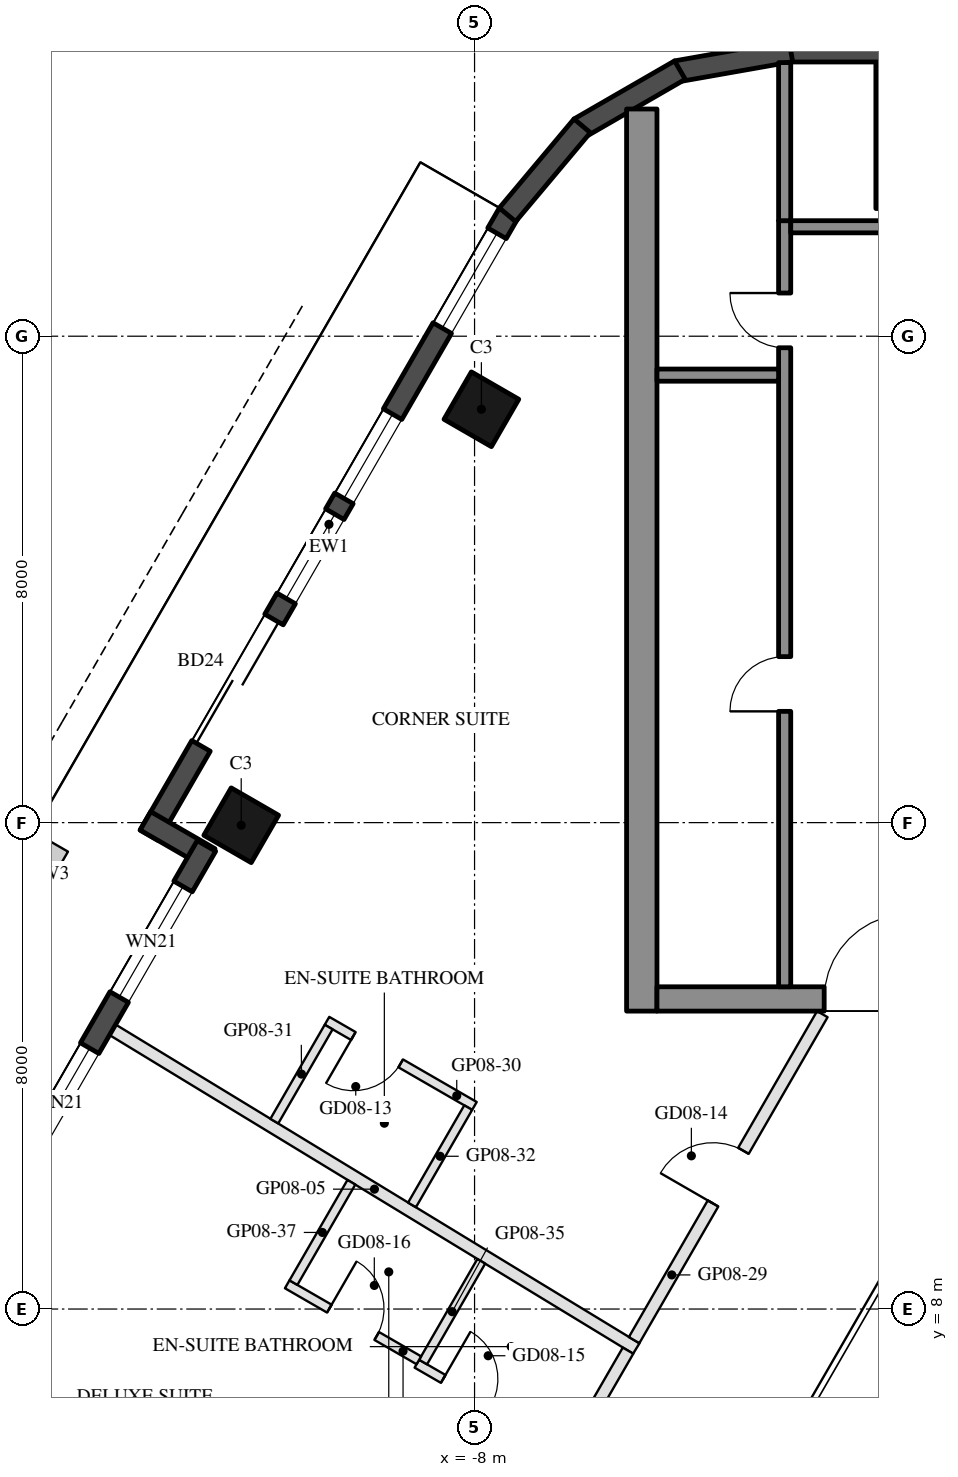
"""IFC4 building model, lengths in metres.
Left out: names, types, materials, properties, quantities, classifications, styles, units other than length and angle.
Written with IfcOpenShell. Run it as: python <this file> out.ifc"""

import sys

from ifc_helpers import new_model, si_unit, direction, frame, frame_2d, origin, origin_2d, place, context, subcontext, project, spatial, rectangle, hollow_rectangle, extrude, element, fill, save


model = new_model("IFC4")
c1 = context("Model", 3, precision=1e-05, world=origin(), true_north=direction((0.0, 1.0)))
c2 = subcontext(c1, "Body", "Model", "MODEL_VIEW")
j1 = project(units=[si_unit("LENGTHUNIT", "METRE"), si_unit("PLANEANGLEUNIT", "RADIAN")], contexts=[c1])
p1 = place(None, origin())
s1 = spatial("IfcSite", under=j1, at=p1, CompositionType="ELEMENT")
p2 = place(p1, origin())
s2 = spatial("IfcBuilding", under=s1, at=p2, CompositionType="ELEMENT")
p3 = place(p2, frame((0.0, 0.0, 105.7)))
s3 = spatial("IfcBuildingStorey", under=s2, at=p3, CompositionType="ELEMENT", Elevation=105.7)
for number, where, z_axis, x_axis in (
    (1, (-7.888, 22.798, 0.0), (0.0, 0.0, 1.0), (0.5, 0.866, 0.0)),
    (2, (-11.838, 15.957, 0.0), (0.0, 0.0, 1.0), (0.5, 0.866, 0.0)),
):
    element("IfcColumn", number, at=place(p3, frame(where, z_axis=z_axis, x_axis=x_axis)), inside=s3, PredefinedType="COLUMN", context=c2, shape_type="SweptSolid", body=[
        extrude(hollow_rectangle(XDim=0.9, YDim=0.9, WallThickness=0.04, at=origin_2d()), origin(), (0.0, 0.0, 1.0), 3.7),
    ])
p4 = place(p3, frame((0.0, 27.3, 0.0), z_axis=(0.0, 0.0, 1.0), x_axis=(1.0, 0.0, 0.0)))
e3 = element("IfcColumn", 3, at=p4, inside=s3, PredefinedType="COLUMN", context=c2, shape_type="SweptSolid", body=[
    extrude(hollow_rectangle(XDim=2.8, YDim=2.4, WallThickness=0.07, at=origin_2d()), origin(), (0.0, 0.0, 1.0), 3.7),
])
p5 = place(p3, frame((-7.441, 26.022, 0.0), z_axis=(0.0, 0.0, 1.0), x_axis=(-0.499992533062, -0.86602971478, 0.0)))
e4 = element("IfcWall", 4, at=p5, inside=s3, PredefinedType="SOLIDWALL", context=c2, shape_type="SweptSolid", body=[
    extrude(rectangle(XDim=11.816, YDim=0.35, at=frame_2d((5.908, 0.0))), origin(), (0.0, 0.0, 1.0), 3.55),
])
p6 = place(p5, frame((0.381, 0.0, 0.3)))
e5 = element("IfcOpeningElement", 5, at=p6, cuts=e4, PredefinedType="OPENING", context=c2, shape_type="SweptSolid", body=[
    extrude(rectangle(XDim=1.8, YDim=2.65, at=frame_2d((0.9, 1.325))), frame((0.0, 0.185, 0.0), z_axis=(0.0, -1.0, 0.0), x_axis=(1.0, 0.0, 0.0)), (0.0, 0.0, 1.0), 0.37),
])
p7 = place(p5, frame((7.716, 0.0, 0.0)))
e6 = element("IfcOpeningElement", 6, at=p7, cuts=e4, PredefinedType="OPENING", context=c2, shape_type="SweptSolid", body=[
    extrude(rectangle(XDim=2.4, YDim=2.4, at=frame_2d((1.2, 1.2))), frame((0.0, 0.185, 0.0), z_axis=(0.0, -1.0, 0.0), x_axis=(1.0, 0.0, 0.0)), (0.0, 0.0, 1.0), 0.37),
])
p8 = place(p5, frame((3.815, 0.0, 0.3)))
e7 = element("IfcOpeningElement", 7, at=p8, cuts=e4, PredefinedType="OPENING", context=c2, shape_type="SweptSolid", body=[
    extrude(rectangle(XDim=1.6, YDim=2.65, at=frame_2d((0.8, 1.325))), frame((0.0, 0.185, 0.0), z_axis=(0.0, -1.0, 0.0), x_axis=(1.0, 0.0, 0.0)), (0.0, 0.0, 1.0), 0.37),
])
p9 = place(p5, frame((5.715, 0.0, 0.3)))
e8 = element("IfcOpeningElement", 8, at=p9, cuts=e4, PredefinedType="OPENING", context=c2, shape_type="SweptSolid", body=[
    extrude(rectangle(XDim=1.6, YDim=2.65, at=frame_2d((0.8, 1.325))), frame((0.0, 0.185, 0.0), z_axis=(0.0, -1.0, 0.0), x_axis=(1.0, 0.0, 0.0)), (0.0, 0.0, 1.0), 0.37),
])
p10 = place(p3, frame((-13.413, 16.029, 0.0), z_axis=(0.0, 0.0, 1.0), x_axis=(0.866005645448, -0.500034220881, 0.0)))
e9 = element("IfcWall", 9, at=p10, inside=s3, PredefinedType="SOLIDWALL", context=c2, shape_type="SweptSolid", body=[
    extrude(rectangle(XDim=1.22, YDim=0.35, at=frame_2d((0.61, 0.0))), origin(), (0.0, 0.0, 1.0), 3.55),
])
p11 = place(p3, frame((-12.409, 15.617, 0.0), z_axis=(0.0, 0.0, 1.0), x_axis=(-0.500003597184, -0.866023326939, 0.0)))
e10 = element("IfcWall", 10, at=p11, inside=s3, PredefinedType="SOLIDWALL", context=c2, shape_type="SweptSolid", body=[
    extrude(rectangle(XDim=6.74, YDim=0.35, at=frame_2d((3.37, 0.0))), origin(), (0.0, 0.0, 1.0), 3.55),
])
p12 = place(p11, frame((0.77, 0.0, 0.3)))
e11 = element("IfcOpeningElement", 11, at=p12, cuts=e10, PredefinedType="OPENING", context=c2, shape_type="SweptSolid", body=[
    extrude(rectangle(XDim=2.1, YDim=2.65, at=frame_2d((1.05, 1.325))), frame((0.0, 0.185, 0.0), z_axis=(0.0, -1.0, 0.0), x_axis=(1.0, 0.0, 0.0)), (0.0, 0.0, 1.0), 0.37),
])
p13 = place(p11, frame((3.841, 0.0, 0.3)))
e12 = element("IfcOpeningElement", 12, at=p13, cuts=e10, PredefinedType="OPENING", context=c2, shape_type="SweptSolid", body=[
    extrude(rectangle(XDim=2.1, YDim=2.65, at=frame_2d((1.05, 1.325))), frame((0.0, 0.185, 0.0), z_axis=(0.0, -1.0, 0.0), x_axis=(1.0, 0.0, 0.0)), (0.0, 0.0, 1.0), 0.37),
])
p14 = place(p3, frame((2.829, 28.685, 0.0), z_axis=(0.0, 0.0, 1.0), x_axis=(-1.0, 0.0, 0.0)))
e13 = element("IfcWall", 13, at=p14, inside=s3, PredefinedType="SOLIDWALL", context=c2, shape_type="SweptSolid", body=[
    extrude(rectangle(XDim=5.658, YDim=0.35, at=frame_2d((2.829, 0.0))), origin(), (0.0, 0.0, 1.0), 3.55),
])
for number, where, z_axis, x_axis in (
    (14, (-2.799, 28.688, 0.0), (0.0, 0.0, 1.0), (-0.985, -0.174, 0.0)),
    (15, (-4.623, 28.377, 0.0), (0.0, 0.0, 1.0), (-0.866, -0.5, 0.0)),
):
    element("IfcWall", number, at=place(p3, frame(where, z_axis=z_axis, x_axis=x_axis)), inside=s3, PredefinedType="SOLIDWALL", context=c2, shape_type="SweptSolid", body=[
        extrude(rectangle(XDim=1.91, YDim=0.35, at=frame_2d((0.955, 0.0))), origin(), (0.0, 0.0, 1.0), 3.55),
    ])
p15 = place(p3, frame((-6.23, 27.461, 0.0), z_axis=(0.0, 0.0, 1.0), x_axis=(-0.642808304945, -0.766027077259, 0.0)))
e16 = element("IfcWall", 16, at=p15, inside=s3, PredefinedType="SOLIDWALL", context=c2, shape_type="SweptSolid", body=[
    extrude(rectangle(XDim=1.91, YDim=0.35, at=frame_2d((0.955, 0.0))), origin(), (0.0, 0.0, 1.0), 3.55),
])
p16 = place(p3, frame((-5.25, 12.9, 0.0), z_axis=(0.0, 0.0, 1.0), x_axis=(0.0, 1.0, 0.0)))
e17 = element("IfcWall", 17, at=p16, inside=s3, PredefinedType="SHEAR", context=c2, shape_type="SweptSolid", body=[
    extrude(rectangle(XDim=14.837, YDim=0.5, at=frame_2d((7.418, 0.0))), origin(), (0.0, 0.0, 1.0), 3.5),
])
p17 = place(p3, frame((5.0, 13.1, 0.0), z_axis=(0.0, 0.0, 1.0), x_axis=(-1.0, 0.0, 0.0)))
e18 = element("IfcWall", 18, at=p17, inside=s3, PredefinedType="SHEAR", context=c2, shape_type="SweptSolid", body=[
    extrude(rectangle(XDim=10.0, YDim=0.4, at=frame_2d((5.0, 0.0))), origin(), (0.0, 0.0, 1.0), 3.5),
])
p18 = place(p17, frame((3.55, 0.0, 0.0)))
e19 = element("IfcOpeningElement", 19, at=p18, cuts=e18, PredefinedType="OPENING", context=c2, shape_type="SweptSolid", body=[
    extrude(rectangle(XDim=1.1, YDim=2.1, at=frame_2d((0.55, 1.05))), frame((0.0, 0.21, 0.0), z_axis=(0.0, -1.0, 0.0), x_axis=(1.0, 0.0, 0.0)), (0.0, 0.0, 1.0), 0.42),
])
p19 = place(p17, frame((5.85, 0.0, 0.0)))
e20 = element("IfcOpeningElement", 20, at=p19, cuts=e18, PredefinedType="OPENING", context=c2, shape_type="SweptSolid", body=[
    extrude(rectangle(XDim=1.4, YDim=2.1, at=frame_2d((0.7, 1.05))), frame((0.0, 0.21, 0.0), z_axis=(0.0, -1.0, 0.0), x_axis=(1.0, 0.0, 0.0)), (0.0, 0.0, 1.0), 0.42),
])
p20 = place(p3, frame((-2.9, 13.3, 0.0), z_axis=(0.0, 0.0, 1.0), x_axis=(0.0, 1.0, 0.0)))
e21 = element("IfcWall", 21, at=p20, inside=s3, PredefinedType="SHEAR", context=c2, shape_type="SweptSolid", body=[
    extrude(rectangle(XDim=12.6, YDim=0.2, at=frame_2d((6.3, 0.0))), origin(), (0.0, 0.0, 1.0), 3.5),
])
p21 = place(p20, frame((4.53, 0.0, 0.0)))
e22 = element("IfcOpeningElement", 22, at=p21, cuts=e21, PredefinedType="OPENING", context=c2, shape_type="SweptSolid", body=[
    extrude(rectangle(XDim=0.9, YDim=2.1, at=frame_2d((0.45, 1.05))), frame((0.0, 0.11, 0.0), z_axis=(0.0, -1.0, 0.0), x_axis=(1.0, 0.0, 0.0)), (0.0, 0.0, 1.0), 0.22),
])
p22 = place(p20, frame((10.51, 0.0, 0.0)))
e23 = element("IfcOpeningElement", 23, at=p22, cuts=e21, PredefinedType="OPENING", context=c2, shape_type="SweptSolid", body=[
    extrude(rectangle(XDim=0.9, YDim=2.1, at=frame_2d((0.45, 1.05))), frame((0.0, 0.11, 0.0), z_axis=(0.0, -1.0, 0.0), x_axis=(1.0, 0.0, 0.0)), (0.0, 0.0, 1.0), 0.22),
])
p23 = place(p3, frame((-0.4, 25.8, 0.0), z_axis=(0.0, 0.0, 1.0), x_axis=(-1.0, 0.0, 0.0)))
e24 = element("IfcWall", 24, at=p23, inside=s3, PredefinedType="SHEAR", context=c2, shape_type="SweptSolid", body=[
    extrude(rectangle(XDim=2.4, YDim=0.2, at=frame_2d((1.2, 0.0))), origin(), (0.0, 0.0, 1.0), 3.5),
])
p24 = place(p3, frame((-3.0, 23.36, 0.0), z_axis=(0.0, 0.0, 1.0), x_axis=(-1.0, 0.0, 0.0)))
e25 = element("IfcWall", 25, at=p24, inside=s3, PredefinedType="SHEAR", context=c2, shape_type="SweptSolid", body=[
    extrude(rectangle(XDim=2.0, YDim=0.2, at=frame_2d((1.0, 0.0))), origin(), (0.0, 0.0, 1.0), 3.5),
])
p25 = place(p3, frame((-2.9, 25.9, 0.0), z_axis=(0.0, 0.0, 1.0), x_axis=(0.0, 1.0, 0.0)))
e26 = element("IfcWall", 26, at=p25, inside=s3, PredefinedType="SHEAR", context=c2, shape_type="SweptSolid", body=[
    extrude(rectangle(XDim=2.6, YDim=0.2, at=frame_2d((1.3, 0.0))), origin(), (0.0, 0.0, 1.0), 3.5),
])
p26 = place(p3, frame((-13.953, 12.593, 0.0), z_axis=(0.0, 0.0, 1.0), x_axis=(0.854198088033, -0.519947715065, 0.0)))
e27 = element("IfcWall", 27, at=p26, inside=s3, PredefinedType="PARTITIONING", context=c2, shape_type="SweptSolid", body=[
    extrude(rectangle(XDim=10.083, YDim=0.2, at=frame_2d((5.041, 0.0))), origin(), (0.0, 0.0, 1.0), 2.95),
])
p27 = place(p3, frame((-5.376, 7.489, 0.0), z_axis=(0.0, 0.0, 1.0), x_axis=(0.499998977725, 0.866025993994, 0.0)))
e28 = element("IfcWall", 28, at=p27, inside=s3, PredefinedType="PARTITIONING", context=c2, shape_type="SweptSolid", body=[
    extrude(rectangle(XDim=6.19, YDim=0.2, at=frame_2d((3.095, 0.0))), origin(), (0.0, 0.0, 1.0), 2.95),
])
p28 = place(p27, frame((2.595, 0.0, 0.0)))
e29 = element("IfcOpeningElement", 29, at=p28, cuts=e28, PredefinedType="OPENING", context=c2, shape_type="SweptSolid", body=[
    extrude(rectangle(XDim=1.0, YDim=2.1, at=frame_2d((0.5, 1.05))), frame((0.0, 0.11, 0.0), z_axis=(0.0, -1.0, 0.0), x_axis=(1.0, 0.0, 0.0)), (0.0, 0.0, 1.0), 0.22),
])
p29 = place(p3, frame((-8.002, 11.34, 0.0), z_axis=(0.0, 0.0, 1.0), x_axis=(-0.865996816683, 0.500049511043, 0.0)))
e30 = element("IfcWall", 30, at=p29, inside=s3, PredefinedType="PARTITIONING", context=c2, shape_type="SweptSolid", body=[
    extrude(rectangle(XDim=2.8, YDim=0.15, at=frame_2d((1.4, 0.0))), origin(), (0.0, 0.0, 1.0), 3.55),
])
p30 = place(p29, frame((1.4, 0.0, 0.0)))
e31 = element("IfcOpeningElement", 31, at=p30, cuts=e30, PredefinedType="OPENING", context=c2, shape_type="SweptSolid", body=[
    extrude(rectangle(XDim=0.9, YDim=2.1, at=frame_2d((0.45, 1.05))), frame((0.0, 0.085, 0.0), z_axis=(0.0, -1.0, 0.0), x_axis=(1.0, 0.0, 0.0)), (0.0, 0.0, 1.0), 0.17),
])
p31 = place(p3, frame((-10.399, 12.638, 0.0), z_axis=(0.0, 0.0, 1.0), x_axis=(-0.499974788625, -0.866039959089, 0.0)))
e32 = element("IfcWall", 32, at=p31, inside=s3, PredefinedType="PARTITIONING", context=c2, shape_type="SweptSolid", body=[
    extrude(rectangle(XDim=1.787, YDim=0.15, at=frame_2d((0.893, 0.0))), origin(), (0.0, 0.0, 1.0), 2.95),
])
p32 = place(p3, frame((-8.104, 11.313, 0.0), z_axis=(0.0, 0.0, 1.0), x_axis=(-0.499989263917, -0.866031602176, 0.0)))
e33 = element("IfcWall", 33, at=p32, inside=s3, PredefinedType="PARTITIONING", context=c2, shape_type="SweptSolid", body=[
    extrude(rectangle(XDim=1.848, YDim=0.15, at=frame_2d((0.924, 0.0))), origin(), (0.0, 0.0, 1.0), 2.95),
])
p33 = place(p3, frame((-9.326, 0.647, 0.0), z_axis=(0.0, 0.0, 1.0), x_axis=(0.499982277793, 0.866035635464, 0.0)))
e34 = element("IfcWall", 34, at=p33, inside=s3, PredefinedType="PARTITIONING", context=c2, shape_type="SweptSolid", body=[
    extrude(rectangle(XDim=7.7, YDim=0.2, at=frame_2d((3.85, 0.0))), origin(), (0.0, 0.0, 1.0), 2.95),
])
p34 = place(p33, frame((4.252, 0.0, 0.0)))
e35 = element("IfcOpeningElement", 35, at=p34, cuts=e34, PredefinedType="OPENING", context=c2, shape_type="SweptSolid", body=[
    extrude(rectangle(XDim=1.0, YDim=2.1, at=frame_2d((0.5, 1.05))), frame((0.0, 0.11, 0.0), z_axis=(0.0, -1.0, 0.0), x_axis=(1.0, 0.0, 0.0)), (0.0, 0.0, 1.0), 0.22),
])
p35 = place(p3, frame((-8.948, 7.101, 0.0), z_axis=(0.0, 0.0, 1.0), x_axis=(0.866034573852, -0.49998411664, 0.0)))
e36 = element("IfcWall", 36, at=p35, inside=s3, PredefinedType="PARTITIONING", context=c2, shape_type="SweptSolid", body=[
    extrude(rectangle(XDim=2.8, YDim=0.15, at=frame_2d((1.4, 0.0))), origin(), (0.0, 0.0, 1.0), 3.55),
])
p36 = place(p35, frame((0.5, 0.0, 0.0)))
e37 = element("IfcOpeningElement", 37, at=p36, cuts=e36, PredefinedType="OPENING", context=c2, shape_type="SweptSolid", body=[
    extrude(rectangle(XDim=0.9, YDim=2.1, at=frame_2d((0.45, 1.05))), frame((0.0, 0.085, 0.0), z_axis=(0.0, -1.0, 0.0), x_axis=(1.0, 0.0, 0.0)), (0.0, 0.0, 1.0), 0.17),
])
p37 = place(p3, frame((-7.89, 8.785, 0.0), z_axis=(0.0, 0.0, 1.0), x_axis=(-0.499954417993, -0.866051718969, 0.0)))
e38 = element("IfcWall", 38, at=p37, inside=s3, PredefinedType="PARTITIONING", context=c2, shape_type="SweptSolid", body=[
    extrude(rectangle(XDim=1.913, YDim=0.15, at=frame_2d((0.957, 0.0))), origin(), (0.0, 0.0, 1.0), 3.55),
])
p38 = place(p3, frame((-11.081, 8.407, 0.0), z_axis=(0.0, 0.0, 1.0), x_axis=(0.866047370643, -0.499961950354, 0.0)))
e39 = element("IfcWall", 39, at=p38, inside=s3, PredefinedType="PARTITIONING", context=c2, shape_type="SweptSolid", body=[
    extrude(rectangle(XDim=2.5, YDim=0.15, at=frame_2d((1.25, 0.0))), origin(), (0.0, 0.0, 1.0), 3.55),
])
p39 = place(p38, frame((0.8, 0.0, 0.0)))
e40 = element("IfcOpeningElement", 40, at=p39, cuts=e39, PredefinedType="OPENING", context=c2, shape_type="SweptSolid", body=[
    extrude(rectangle(XDim=0.9, YDim=2.1, at=frame_2d((0.45, 1.05))), frame((0.0, 0.085, 0.0), z_axis=(0.0, -1.0, 0.0), x_axis=(1.0, 0.0, 0.0)), (0.0, 0.0, 1.0), 0.17),
])
p40 = place(p3, frame((-10.026, 10.085, 0.0), z_axis=(0.0, 0.0, 1.0), x_axis=(-0.49999591573, -0.866027761826, 0.0)))
e41 = element("IfcWall", 41, at=p40, inside=s3, PredefinedType="PARTITIONING", context=c2, shape_type="SweptSolid", body=[
    extrude(rectangle(XDim=1.906, YDim=0.15, at=frame_2d((0.953, 0.0))), origin(), (0.0, 0.0, 1.0), 3.55),
])
p41 = place(p6, origin())
e42 = element("IfcWindow", 42, at=p41, inside=s3, PartitioningType="SINGLE_PANEL", PredefinedType="WINDOW", context=c2, shape_type="SweptSolid", body=[
    extrude(rectangle(XDim=1.8, YDim=2.65, at=frame_2d((0.9, 1.325))), frame((0.0, 0.03, 0.0), z_axis=(0.0, -1.0, 0.0), x_axis=(1.0, 0.0, 0.0)), (0.0, 0.0, 1.0), 0.06),
])
fill(e5, e42)
p42 = place(p7, frame((2.4, 0.0, 0.0), z_axis=(0.0, 0.0, 1.0), x_axis=(-1.0, 0.0, 0.0)))
e43 = element("IfcDoor", 43, at=p42, inside=s3, OperationType="SLIDING_TO_LEFT", PredefinedType="DOOR", context=c2, shape_type="SweptSolid", body=[
    extrude(rectangle(XDim=2.4, YDim=2.4, at=frame_2d((1.2, 1.2))), frame((0.0, 0.025, 0.0), z_axis=(0.0, -1.0, 0.0), x_axis=(1.0, 0.0, 0.0)), (0.0, 0.0, 1.0), 0.05),
])
fill(e6, e43)
p43 = place(p8, origin())
e44 = element("IfcWindow", 44, at=p43, inside=s3, PartitioningType="SINGLE_PANEL", PredefinedType="WINDOW", context=c2, shape_type="SweptSolid", body=[
    extrude(rectangle(XDim=1.6, YDim=2.65, at=frame_2d((0.8, 1.325))), frame((0.0, 0.03, 0.0), z_axis=(0.0, -1.0, 0.0), x_axis=(1.0, 0.0, 0.0)), (0.0, 0.0, 1.0), 0.06),
])
fill(e7, e44)
p44 = place(p9, origin())
e45 = element("IfcWindow", 45, at=p44, inside=s3, PartitioningType="SINGLE_PANEL", PredefinedType="WINDOW", context=c2, shape_type="SweptSolid", body=[
    extrude(rectangle(XDim=1.6, YDim=2.65, at=frame_2d((0.8, 1.325))), frame((0.0, 0.03, 0.0), z_axis=(0.0, -1.0, 0.0), x_axis=(1.0, 0.0, 0.0)), (0.0, 0.0, 1.0), 0.06),
])
fill(e8, e45)
p45 = place(p12, origin())
e46 = element("IfcWindow", 46, at=p45, inside=s3, PartitioningType="SINGLE_PANEL", PredefinedType="WINDOW", context=c2, shape_type="SweptSolid", body=[
    extrude(rectangle(XDim=2.1, YDim=2.65, at=frame_2d((1.05, 1.325))), frame((0.0, 0.03, 0.0), z_axis=(0.0, -1.0, 0.0), x_axis=(1.0, 0.0, 0.0)), (0.0, 0.0, 1.0), 0.06),
])
fill(e11, e46)
p46 = place(p13, origin())
e47 = element("IfcWindow", 47, at=p46, inside=s3, PartitioningType="SINGLE_PANEL", PredefinedType="WINDOW", context=c2, shape_type="SweptSolid", body=[
    extrude(rectangle(XDim=2.1, YDim=2.65, at=frame_2d((1.05, 1.325))), frame((0.0, 0.03, 0.0), z_axis=(0.0, -1.0, 0.0), x_axis=(1.0, 0.0, 0.0)), (0.0, 0.0, 1.0), 0.06),
])
fill(e12, e47)
p47 = place(p21, origin())
e48 = element("IfcDoor", 48, at=p47, inside=s3, OperationType="SINGLE_SWING_LEFT", PredefinedType="DOOR", context=c2, shape_type="SweptSolid", body=[
    extrude(rectangle(XDim=0.9, YDim=2.1, at=frame_2d((0.45, 1.05))), frame((0.0, 0.025, 0.0), z_axis=(0.0, -1.0, 0.0), x_axis=(1.0, 0.0, 0.0)), (0.0, 0.0, 1.0), 0.05),
])
fill(e22, e48)
p48 = place(p22, origin())
e49 = element("IfcDoor", 49, at=p48, inside=s3, OperationType="SINGLE_SWING_RIGHT", PredefinedType="DOOR", context=c2, shape_type="SweptSolid", body=[
    extrude(rectangle(XDim=0.9, YDim=2.1, at=frame_2d((0.45, 1.05))), frame((0.0, 0.025, 0.0), z_axis=(0.0, -1.0, 0.0), x_axis=(1.0, 0.0, 0.0)), (0.0, 0.0, 1.0), 0.05),
])
fill(e23, e49)
p49 = place(p19, frame((1.4, 0.0, 0.0), z_axis=(0.0, 0.0, 1.0), x_axis=(-1.0, 0.0, 0.0)))
e50 = element("IfcDoor", 50, at=p49, inside=s3, OperationType="DOUBLE_DOOR_SINGLE_SWING", PredefinedType="DOOR", context=c2, shape_type="SweptSolid", body=[
    extrude(rectangle(XDim=1.4, YDim=2.1, at=frame_2d((0.7, 1.05))), frame((0.0, 0.025, 0.0), z_axis=(0.0, -1.0, 0.0), x_axis=(1.0, 0.0, 0.0)), (0.0, 0.0, 1.0), 0.05),
])
fill(e20, e50)
p50 = place(p30, origin())
e51 = element("IfcDoor", 51, at=p50, inside=s3, OperationType="SINGLE_SWING_RIGHT", PredefinedType="DOOR", context=c2, shape_type="SweptSolid", body=[
    extrude(rectangle(XDim=0.9, YDim=2.1, at=frame_2d((0.45, 1.05))), frame((0.0, 0.025, 0.0), z_axis=(0.0, -1.0, 0.0), x_axis=(1.0, 0.0, 0.0)), (0.0, 0.0, 1.0), 0.05),
])
fill(e31, e51)
p51 = place(p28, origin())
e52 = element("IfcDoor", 52, at=p51, inside=s3, OperationType="SINGLE_SWING_LEFT", PredefinedType="DOOR", context=c2, shape_type="SweptSolid", body=[
    extrude(rectangle(XDim=1.0, YDim=2.1, at=frame_2d((0.5, 1.05))), frame((0.0, 0.025, 0.0), z_axis=(0.0, -1.0, 0.0), x_axis=(1.0, 0.0, 0.0)), (0.0, 0.0, 1.0), 0.05),
])
fill(e29, e52)
p52 = place(p36, origin())
e53 = element("IfcDoor", 53, at=p52, inside=s3, OperationType="SINGLE_SWING_LEFT", PredefinedType="DOOR", context=c2, shape_type="SweptSolid", body=[
    extrude(rectangle(XDim=0.9, YDim=2.1, at=frame_2d((0.45, 1.05))), frame((0.0, 0.025, 0.0), z_axis=(0.0, -1.0, 0.0), x_axis=(1.0, 0.0, 0.0)), (0.0, 0.0, 1.0), 0.05),
])
fill(e37, e53)
p53 = place(p39, origin())
e54 = element("IfcDoor", 54, at=p53, inside=s3, OperationType="SINGLE_SWING_LEFT", PredefinedType="DOOR", context=c2, shape_type="SweptSolid", body=[
    extrude(rectangle(XDim=0.9, YDim=2.1, at=frame_2d((0.45, 1.05))), frame((0.0, 0.025, 0.0), z_axis=(0.0, -1.0, 0.0), x_axis=(1.0, 0.0, 0.0)), (0.0, 0.0, 1.0), 0.05),
])
fill(e40, e54)
save(model, sys.argv[1])
